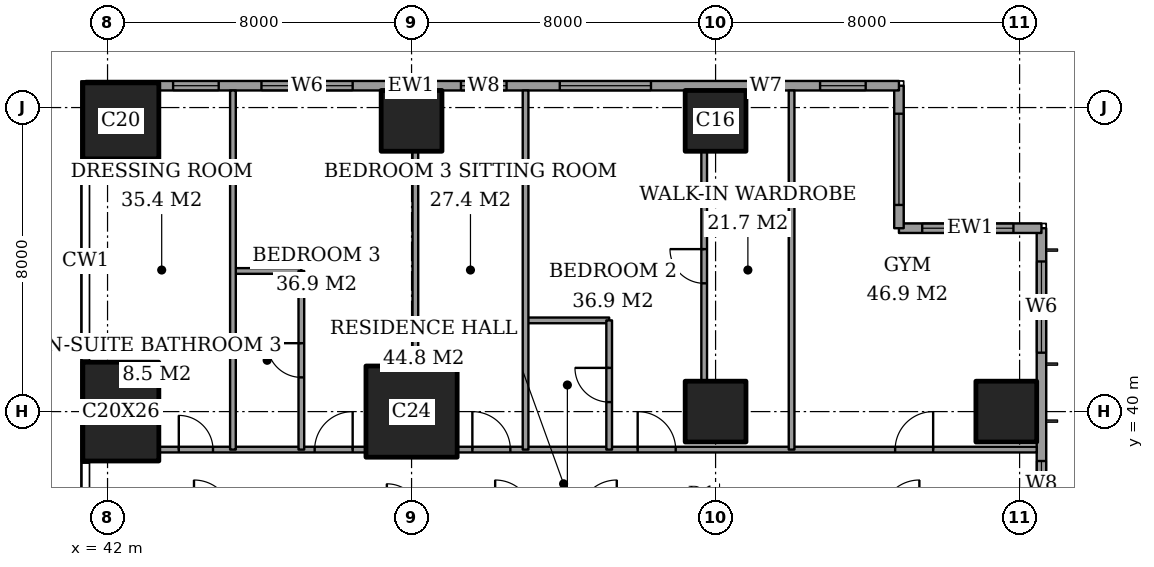
"""IFC4 building model, lengths in metres.
Left out: names, types, materials, properties, quantities, classifications, styles, units other than length and angle.
Written with IfcOpenShell. Run it as: python <this file> out.ifc"""

import sys

from ifc_helpers import new_model, si_unit, direction, frame, frame_2d, origin, origin_2d, place, context, subcontext, project, spatial, rectangle, extrude, element, fill, save


model = new_model("IFC4")
c1 = context("Model", 3, precision=1e-05, world=origin(), true_north=direction((0.0, 1.0)))
c2 = subcontext(c1, "Body", "Model", "MODEL_VIEW")
j1 = project(units=[si_unit("LENGTHUNIT", "METRE"), si_unit("PLANEANGLEUNIT", "RADIAN")], contexts=[c1])
p1 = place(None, origin())
s1 = spatial("IfcSite", under=j1, at=p1, CompositionType="ELEMENT")
p2 = place(p1, origin())
s2 = spatial("IfcBuilding", under=s1, at=p2, CompositionType="ELEMENT")
p3 = place(p2, frame((0.0, 0.0, 244.8)))
s3 = spatial("IfcBuildingStorey", under=s2, at=p3, CompositionType="ELEMENT", Elevation=244.8)
p4 = place(p3, frame((42.35, 40.0, 0.0), z_axis=(0.0, 0.0, 1.0), x_axis=(1.0, 0.0, 0.0)))
e1 = element("IfcColumn", 1, at=p4, inside=s3, PredefinedType="COLUMN", context=c2, shape_type="SweptSolid", body=[
    extrude(rectangle(XDim=2.0, YDim=2.6, at=origin_2d()), origin(), (0.0, 0.0, 1.0), 3.6),
])
p5 = place(p3, frame((42.35, 47.65, 0.0), z_axis=(0.0, 0.0, 1.0), x_axis=(1.0, 0.0, 0.0)))
e2 = element("IfcColumn", 2, at=p5, inside=s3, PredefinedType="COLUMN", context=c2, shape_type="SweptSolid", body=[
    extrude(rectangle(XDim=2.0, YDim=2.0, at=origin_2d()), origin(), (0.0, 0.0, 1.0), 3.6),
])
p6 = place(p3, frame((50.0, 40.0, 0.0), z_axis=(0.0, 0.0, 1.0), x_axis=(1.0, 0.0, 0.0)))
e3 = element("IfcColumn", 3, at=p6, inside=s3, PredefinedType="COLUMN", context=c2, shape_type="SweptSolid", body=[
    extrude(rectangle(XDim=2.4, YDim=2.4, at=origin_2d()), origin(), (0.0, 0.0, 1.0), 3.6),
])
for number, where, z_axis, x_axis in (
    (4, (50.0, 47.65, 0.0), (0.0, 0.0, 1.0), (1.0, 0.0, 0.0)),
    (5, (58.0, 40.0, 0.0), (0.0, 0.0, 1.0), (1.0, 0.0, 0.0)),
    (6, (58.0, 47.65, 0.0), (0.0, 0.0, 1.0), (1.0, 0.0, 0.0)),
    (7, (65.65, 40.0, 0.0), (0.0, 0.0, 1.0), (1.0, 0.0, 0.0)),
):
    element("IfcColumn", number, at=place(p3, frame(where, z_axis=z_axis, x_axis=x_axis)), inside=s3, PredefinedType="COLUMN", context=c2, shape_type="SweptSolid", body=[
        extrude(rectangle(XDim=1.6, YDim=1.6, at=origin_2d()), origin(), (0.0, 0.0, 1.0), 3.6),
    ])
p7 = place(p3, frame((66.575, 3.175, 0.0), z_axis=(0.0, 0.0, 1.0), x_axis=(0.0, 1.0, 0.0)))
e8 = element("IfcWall", 8, at=p7, inside=s3, PredefinedType="SOLIDWALL", context=c2, shape_type="SweptSolid", body=[
    extrude(rectangle(XDim=41.65, YDim=0.25, at=frame_2d((20.825, 0.0))), origin(), (0.0, 0.0, 1.0), 3.6),
])
p8 = place(p7, frame((0.875, 0.0, 0.6)))
e9 = element("IfcOpeningElement", 9, at=p8, cuts=e8, PredefinedType="OPENING", context=c2, shape_type="SweptSolid", body=[
    extrude(rectangle(XDim=2.4, YDim=2.0, at=frame_2d((1.2, 1.0))), frame((0.0, 0.135, 0.0), z_axis=(0.0, -1.0, 0.0), x_axis=(1.0, 0.0, 0.0)), (0.0, 0.0, 1.0), 0.27),
])
p9 = place(p7, frame((6.0, 0.0, 0.6)))
e10 = element("IfcOpeningElement", 10, at=p9, cuts=e8, PredefinedType="OPENING", context=c2, shape_type="SweptSolid", body=[
    extrude(rectangle(XDim=1.2, YDim=2.0, at=frame_2d((0.6, 1.0))), frame((0.0, 0.135, 0.0), z_axis=(0.0, -1.0, 0.0), x_axis=(1.0, 0.0, 0.0)), (0.0, 0.0, 1.0), 0.27),
])
p10 = place(p7, frame((8.525, 0.0, 0.6)))
e11 = element("IfcOpeningElement", 11, at=p10, cuts=e8, PredefinedType="OPENING", context=c2, shape_type="SweptSolid", body=[
    extrude(rectangle(XDim=2.4, YDim=2.0, at=frame_2d((1.2, 1.0))), frame((0.0, 0.135, 0.0), z_axis=(0.0, -1.0, 0.0), x_axis=(1.0, 0.0, 0.0)), (0.0, 0.0, 1.0), 0.27),
])
p11 = place(p7, frame((15.725, 0.0, 0.6)))
e12 = element("IfcOpeningElement", 12, at=p11, cuts=e8, PredefinedType="OPENING", context=c2, shape_type="SweptSolid", body=[
    extrude(rectangle(XDim=2.4, YDim=2.0, at=frame_2d((1.2, 1.0))), frame((0.0, 0.135, 0.0), z_axis=(0.0, -1.0, 0.0), x_axis=(1.0, 0.0, 0.0)), (0.0, 0.0, 1.0), 0.27),
])
p12 = place(p7, frame((23.525, 0.0, 0.6)))
e13 = element("IfcOpeningElement", 13, at=p12, cuts=e8, PredefinedType="OPENING", context=c2, shape_type="SweptSolid", body=[
    extrude(rectangle(XDim=2.4, YDim=2.0, at=frame_2d((1.2, 1.0))), frame((0.0, 0.135, 0.0), z_axis=(0.0, -1.0, 0.0), x_axis=(1.0, 0.0, 0.0)), (0.0, 0.0, 1.0), 0.27),
])
p13 = place(p7, frame((30.625, 0.0, 0.6)))
e14 = element("IfcOpeningElement", 14, at=p13, cuts=e8, PredefinedType="OPENING", context=c2, shape_type="SweptSolid", body=[
    extrude(rectangle(XDim=2.4, YDim=2.0, at=frame_2d((1.2, 1.0))), frame((0.0, 0.135, 0.0), z_axis=(0.0, -1.0, 0.0), x_axis=(1.0, 0.0, 0.0)), (0.0, 0.0, 1.0), 0.27),
])
p14 = place(p7, frame((34.325, 0.0, 0.6)))
e15 = element("IfcOpeningElement", 15, at=p14, cuts=e8, PredefinedType="OPENING", context=c2, shape_type="SweptSolid", body=[
    extrude(rectangle(XDim=1.2, YDim=2.0, at=frame_2d((0.6, 1.0))), frame((0.0, 0.135, 0.0), z_axis=(0.0, -1.0, 0.0), x_axis=(1.0, 0.0, 0.0)), (0.0, 0.0, 1.0), 0.27),
])
p15 = place(p7, frame((38.375, 0.0, 0.6)))
e16 = element("IfcOpeningElement", 16, at=p15, cuts=e8, PredefinedType="OPENING", context=c2, shape_type="SweptSolid", body=[
    extrude(rectangle(XDim=2.4, YDim=2.0, at=frame_2d((1.2, 1.0))), frame((0.0, 0.135, 0.0), z_axis=(0.0, -1.0, 0.0), x_axis=(1.0, 0.0, 0.0)), (0.0, 0.0, 1.0), 0.27),
])
p16 = place(p3, frame((66.575, 44.825, 0.0), z_axis=(0.0, 0.0, 1.0), x_axis=(-1.0, 0.0, 0.0)))
e17 = element("IfcWall", 17, at=p16, inside=s3, PredefinedType="SOLIDWALL", context=c2, shape_type="SweptSolid", body=[
    extrude(rectangle(XDim=3.75, YDim=0.25, at=frame_2d((1.875, 0.0))), origin(), (0.0, 0.0, 1.0), 3.6),
])
p17 = place(p16, frame((0.738, 0.0, 0.6)))
e18 = element("IfcOpeningElement", 18, at=p17, cuts=e17, PredefinedType="OPENING", context=c2, shape_type="SweptSolid", body=[
    extrude(rectangle(XDim=2.4, YDim=2.0, at=frame_2d((1.2, 1.0))), frame((0.0, 0.135, 0.0), z_axis=(0.0, -1.0, 0.0), x_axis=(1.0, 0.0, 0.0)), (0.0, 0.0, 1.0), 0.27),
])
p18 = place(p3, frame((62.825, 44.825, 0.0), z_axis=(0.0, 0.0, 1.0), x_axis=(0.0, 1.0, 0.0)))
e19 = element("IfcWall", 19, at=p18, inside=s3, PredefinedType="SOLIDWALL", context=c2, shape_type="SweptSolid", body=[
    extrude(rectangle(XDim=3.75, YDim=0.25, at=frame_2d((1.875, 0.0))), origin(), (0.0, 0.0, 1.0), 3.6),
])
p19 = place(p18, frame((0.613, 0.0, 0.6)))
e20 = element("IfcOpeningElement", 20, at=p19, cuts=e19, PredefinedType="OPENING", context=c2, shape_type="SweptSolid", body=[
    extrude(rectangle(XDim=2.4, YDim=2.0, at=frame_2d((1.2, 1.0))), frame((0.0, 0.135, 0.0), z_axis=(0.0, -1.0, 0.0), x_axis=(1.0, 0.0, 0.0)), (0.0, 0.0, 1.0), 0.27),
])
p20 = place(p3, frame((62.825, 48.575, 0.0), z_axis=(0.0, 0.0, 1.0), x_axis=(-1.0, 0.0, 0.0)))
e21 = element("IfcWall", 21, at=p20, inside=s3, PredefinedType="SOLIDWALL", context=c2, shape_type="SweptSolid", body=[
    extrude(rectangle(XDim=21.4, YDim=0.25, at=frame_2d((10.7, 0.0))), origin(), (0.0, 0.0, 1.0), 3.6),
])
p21 = place(p20, frame((0.875, 0.0, 0.6)))
e22 = element("IfcOpeningElement", 22, at=p21, cuts=e21, PredefinedType="OPENING", context=c2, shape_type="SweptSolid", body=[
    extrude(rectangle(XDim=1.2, YDim=2.0, at=frame_2d((0.6, 1.0))), frame((0.0, 0.135, 0.0), z_axis=(0.0, -1.0, 0.0), x_axis=(1.0, 0.0, 0.0)), (0.0, 0.0, 1.0), 0.27),
])
p22 = place(p20, frame((3.2, 0.0, 0.6)))
e23 = element("IfcOpeningElement", 23, at=p22, cuts=e21, PredefinedType="OPENING", context=c2, shape_type="SweptSolid", body=[
    extrude(rectangle(XDim=0.6, YDim=2.0, at=frame_2d((0.3, 1.0))), frame((0.0, 0.135, 0.0), z_axis=(0.0, -1.0, 0.0), x_axis=(1.0, 0.0, 0.0)), (0.0, 0.0, 1.0), 0.27),
])
p23 = place(p20, frame((6.525, 0.0, 0.6)))
e24 = element("IfcOpeningElement", 24, at=p23, cuts=e21, PredefinedType="OPENING", context=c2, shape_type="SweptSolid", body=[
    extrude(rectangle(XDim=2.4, YDim=2.0, at=frame_2d((1.2, 1.0))), frame((0.0, 0.135, 0.0), z_axis=(0.0, -1.0, 0.0), x_axis=(1.0, 0.0, 0.0)), (0.0, 0.0, 1.0), 0.27),
])
p24 = place(p20, frame((10.325, 0.0, 0.6)))
e25 = element("IfcOpeningElement", 25, at=p24, cuts=e21, PredefinedType="OPENING", context=c2, shape_type="SweptSolid", body=[
    extrude(rectangle(XDim=1.2, YDim=2.0, at=frame_2d((0.6, 1.0))), frame((0.0, 0.135, 0.0), z_axis=(0.0, -1.0, 0.0), x_axis=(1.0, 0.0, 0.0)), (0.0, 0.0, 1.0), 0.27),
])
p25 = place(p20, frame((14.375, 0.0, 0.6)))
e26 = element("IfcOpeningElement", 26, at=p25, cuts=e21, PredefinedType="OPENING", context=c2, shape_type="SweptSolid", body=[
    extrude(rectangle(XDim=2.4, YDim=2.0, at=frame_2d((1.2, 1.0))), frame((0.0, 0.135, 0.0), z_axis=(0.0, -1.0, 0.0), x_axis=(1.0, 0.0, 0.0)), (0.0, 0.0, 1.0), 0.27),
])
p26 = place(p20, frame((17.9, 0.0, 0.6)))
e27 = element("IfcOpeningElement", 27, at=p26, cuts=e21, PredefinedType="OPENING", context=c2, shape_type="SweptSolid", body=[
    extrude(rectangle(XDim=1.2, YDim=2.0, at=frame_2d((0.6, 1.0))), frame((0.0, 0.135, 0.0), z_axis=(0.0, -1.0, 0.0), x_axis=(1.0, 0.0, 0.0)), (0.0, 0.0, 1.0), 0.27),
])
p27 = place(p3, frame((43.35, 39.0, 0.0), z_axis=(0.0, 0.0, 1.0), x_axis=(1.0, 0.0, 0.0)))
e28 = element("IfcWall", 28, at=p27, inside=s3, PredefinedType="PARTITIONING", context=c2, shape_type="SweptSolid", body=[
    extrude(rectangle(XDim=5.45, YDim=0.15, at=frame_2d((2.725, 0.0))), origin(), (0.0, 0.0, 1.0), 3.35),
])
p28 = place(p27, frame((4.1, 0.0, 0.0)))
e29 = element("IfcOpeningElement", 29, at=p28, cuts=e28, PredefinedType="OPENING", context=c2, shape_type="SweptSolid", body=[
    extrude(rectangle(XDim=1.0, YDim=2.1, at=frame_2d((0.5, 1.05))), frame((0.0, 0.085, 0.0), z_axis=(0.0, -1.0, 0.0), x_axis=(1.0, 0.0, 0.0)), (0.0, 0.0, 1.0), 0.17),
])
p29 = place(p27, frame((0.525, 0.0, 0.0)))
e30 = element("IfcOpeningElement", 30, at=p29, cuts=e28, PredefinedType="OPENING", context=c2, shape_type="SweptSolid", body=[
    extrude(rectangle(XDim=0.9, YDim=2.1, at=frame_2d((0.45, 1.05))), frame((0.0, 0.085, 0.0), z_axis=(0.0, -1.0, 0.0), x_axis=(1.0, 0.0, 0.0)), (0.0, 0.0, 1.0), 0.17),
])
p30 = place(p3, frame((51.2, 39.0, 0.0), z_axis=(0.0, 0.0, 1.0), x_axis=(1.0, 0.0, 0.0)))
e31 = element("IfcWall", 31, at=p30, inside=s3, PredefinedType="PARTITIONING", context=c2, shape_type="SweptSolid", body=[
    extrude(rectangle(XDim=15.25, YDim=0.15, at=frame_2d((7.625, 0.0))), origin(), (0.0, 0.0, 1.0), 3.35),
])
p31 = place(p30, frame((11.525, 0.0, 0.0)))
e32 = element("IfcOpeningElement", 32, at=p31, cuts=e31, PredefinedType="OPENING", context=c2, shape_type="SweptSolid", body=[
    extrude(rectangle(XDim=1.0, YDim=2.1, at=frame_2d((0.5, 1.05))), frame((0.0, 0.085, 0.0), z_axis=(0.0, -1.0, 0.0), x_axis=(1.0, 0.0, 0.0)), (0.0, 0.0, 1.0), 0.17),
])
p32 = place(p30, frame((4.75, 0.0, 0.0)))
e33 = element("IfcOpeningElement", 33, at=p32, cuts=e31, PredefinedType="OPENING", context=c2, shape_type="SweptSolid", body=[
    extrude(rectangle(XDim=1.0, YDim=2.1, at=frame_2d((0.5, 1.05))), frame((0.0, 0.085, 0.0), z_axis=(0.0, -1.0, 0.0), x_axis=(1.0, 0.0, 0.0)), (0.0, 0.0, 1.0), 0.17),
])
p33 = place(p30, frame((0.4, 0.0, 0.0)))
e34 = element("IfcOpeningElement", 34, at=p33, cuts=e31, PredefinedType="OPENING", context=c2, shape_type="SweptSolid", body=[
    extrude(rectangle(XDim=1.0, YDim=2.1, at=frame_2d((0.5, 1.05))), frame((0.0, 0.085, 0.0), z_axis=(0.0, -1.0, 0.0), x_axis=(1.0, 0.0, 0.0)), (0.0, 0.0, 1.0), 0.17),
])
p34 = place(p3, frame((53.0, 42.4, 0.0), z_axis=(0.0, 0.0, 1.0), x_axis=(1.0, 0.0, 0.0)))
e35 = element("IfcWall", 35, at=p34, inside=s3, PredefinedType="PARTITIONING", context=c2, shape_type="SweptSolid", body=[
    extrude(rectangle(XDim=2.2, YDim=0.15, at=frame_2d((1.1, 0.0))), origin(), (0.0, 0.0, 1.0), 3.35),
])
p35 = place(p3, frame((45.3, 43.7, 0.0), z_axis=(0.0, 0.0, 1.0), x_axis=(1.0, 0.0, 0.0)))
e36 = element("IfcWall", 36, at=p35, inside=s3, PredefinedType="PARTITIONING", context=c2, shape_type="SweptSolid", body=[
    extrude(rectangle(XDim=1.8, YDim=0.15, at=frame_2d((0.9, 0.0))), origin(), (0.0, 0.0, 1.0), 3.35),
])
p36 = place(p3, frame((45.3, 39.0, 0.0), z_axis=(0.0, 0.0, 1.0), x_axis=(0.0, 1.0, 0.0)))
e37 = element("IfcWall", 37, at=p36, inside=s3, PredefinedType="PARTITIONING", context=c2, shape_type="SweptSolid", body=[
    extrude(rectangle(XDim=9.45, YDim=0.15, at=frame_2d((4.725, 0.0))), origin(), (0.0, 0.0, 1.0), 3.35),
])
p37 = place(p3, frame((47.1, 39.0, 0.0), z_axis=(0.0, 0.0, 1.0), x_axis=(0.0, 1.0, 0.0)))
e38 = element("IfcWall", 38, at=p37, inside=s3, PredefinedType="PARTITIONING", context=c2, shape_type="SweptSolid", body=[
    extrude(rectangle(XDim=4.7, YDim=0.15, at=frame_2d((2.35, 0.0))), origin(), (0.0, 0.0, 1.0), 3.35),
])
p38 = place(p37, frame((1.9, 0.0, 0.0)))
e39 = element("IfcOpeningElement", 39, at=p38, cuts=e38, PredefinedType="OPENING", context=c2, shape_type="SweptSolid", body=[
    extrude(rectangle(XDim=0.9, YDim=2.1, at=frame_2d((0.45, 1.05))), frame((0.0, 0.085, 0.0), z_axis=(0.0, -1.0, 0.0), x_axis=(1.0, 0.0, 0.0)), (0.0, 0.0, 1.0), 0.17),
])
p39 = place(p3, frame((50.1, 41.2, 0.0), z_axis=(0.0, 0.0, 1.0), x_axis=(0.0, 1.0, 0.0)))
e40 = element("IfcWall", 40, at=p39, inside=s3, PredefinedType="PARTITIONING", context=c2, shape_type="SweptSolid", body=[
    extrude(rectangle(XDim=5.65, YDim=0.15, at=frame_2d((2.825, 0.0))), origin(), (0.0, 0.0, 1.0), 3.35),
])
p40 = place(p3, frame((53.0, 39.0, 0.0), z_axis=(0.0, 0.0, 1.0), x_axis=(0.0, 1.0, 0.0)))
e41 = element("IfcWall", 41, at=p40, inside=s3, PredefinedType="PARTITIONING", context=c2, shape_type="SweptSolid", body=[
    extrude(rectangle(XDim=9.45, YDim=0.15, at=frame_2d((4.725, 0.0))), origin(), (0.0, 0.0, 1.0), 3.35),
])
p41 = place(p3, frame((55.2, 39.0, 0.0), z_axis=(0.0, 0.0, 1.0), x_axis=(0.0, 1.0, 0.0)))
e42 = element("IfcWall", 42, at=p41, inside=s3, PredefinedType="PARTITIONING", context=c2, shape_type="SweptSolid", body=[
    extrude(rectangle(XDim=3.4, YDim=0.15, at=frame_2d((1.7, 0.0))), origin(), (0.0, 0.0, 1.0), 3.35),
])
p42 = place(p41, frame((1.25, 0.0, 0.0)))
e43 = element("IfcOpeningElement", 43, at=p42, cuts=e42, PredefinedType="OPENING", context=c2, shape_type="SweptSolid", body=[
    extrude(rectangle(XDim=0.9, YDim=2.1, at=frame_2d((0.45, 1.05))), frame((0.0, 0.085, 0.0), z_axis=(0.0, -1.0, 0.0), x_axis=(1.0, 0.0, 0.0)), (0.0, 0.0, 1.0), 0.17),
])
p43 = place(p3, frame((57.7, 40.8, 0.0), z_axis=(0.0, 0.0, 1.0), x_axis=(0.0, 1.0, 0.0)))
e44 = element("IfcWall", 44, at=p43, inside=s3, PredefinedType="PARTITIONING", context=c2, shape_type="SweptSolid", body=[
    extrude(rectangle(XDim=6.05, YDim=0.15, at=frame_2d((3.025, 0.0))), origin(), (0.0, 0.0, 1.0), 3.35),
])
p44 = place(p43, frame((2.575, 0.0, 0.0)))
e45 = element("IfcOpeningElement", 45, at=p44, cuts=e44, PredefinedType="OPENING", context=c2, shape_type="SweptSolid", body=[
    extrude(rectangle(XDim=0.9, YDim=2.1, at=frame_2d((0.45, 1.05))), frame((0.0, 0.085, 0.0), z_axis=(0.0, -1.0, 0.0), x_axis=(1.0, 0.0, 0.0)), (0.0, 0.0, 1.0), 0.17),
])
p45 = place(p3, frame((60.0, 39.0, 0.0), z_axis=(0.0, 0.0, 1.0), x_axis=(0.0, 1.0, 0.0)))
e46 = element("IfcWall", 46, at=p45, inside=s3, PredefinedType="PARTITIONING", context=c2, shape_type="SweptSolid", body=[
    extrude(rectangle(XDim=9.45, YDim=0.15, at=frame_2d((4.725, 0.0))), origin(), (0.0, 0.0, 1.0), 3.35),
])
p46 = place(p14, origin())
e47 = element("IfcWindow", 47, at=p46, inside=s3, PartitioningType="SINGLE_PANEL", PredefinedType="WINDOW", context=c2, shape_type="SweptSolid", body=[
    extrude(rectangle(XDim=1.2, YDim=2.0, at=frame_2d((0.6, 1.0))), frame((0.0, 0.03, 0.0), z_axis=(0.0, -1.0, 0.0), x_axis=(1.0, 0.0, 0.0)), (0.0, 0.0, 1.0), 0.06),
])
fill(e15, e47)
p47 = place(p15, origin())
e48 = element("IfcWindow", 48, at=p47, inside=s3, PartitioningType="SINGLE_PANEL", PredefinedType="WINDOW", context=c2, shape_type="SweptSolid", body=[
    extrude(rectangle(XDim=2.4, YDim=2.0, at=frame_2d((1.2, 1.0))), frame((0.0, 0.03, 0.0), z_axis=(0.0, -1.0, 0.0), x_axis=(1.0, 0.0, 0.0)), (0.0, 0.0, 1.0), 0.06),
])
fill(e16, e48)
p48 = place(p17, origin())
e49 = element("IfcWindow", 49, at=p48, inside=s3, PartitioningType="SINGLE_PANEL", PredefinedType="WINDOW", context=c2, shape_type="SweptSolid", body=[
    extrude(rectangle(XDim=2.4, YDim=2.0, at=frame_2d((1.2, 1.0))), frame((0.0, 0.03, 0.0), z_axis=(0.0, -1.0, 0.0), x_axis=(1.0, 0.0, 0.0)), (0.0, 0.0, 1.0), 0.06),
])
fill(e18, e49)
p49 = place(p19, origin())
e50 = element("IfcWindow", 50, at=p49, inside=s3, PartitioningType="SINGLE_PANEL", PredefinedType="WINDOW", context=c2, shape_type="SweptSolid", body=[
    extrude(rectangle(XDim=2.4, YDim=2.0, at=frame_2d((1.2, 1.0))), frame((0.0, 0.03, 0.0), z_axis=(0.0, -1.0, 0.0), x_axis=(1.0, 0.0, 0.0)), (0.0, 0.0, 1.0), 0.06),
])
fill(e20, e50)
p50 = place(p21, origin())
e51 = element("IfcWindow", 51, at=p50, inside=s3, PartitioningType="SINGLE_PANEL", PredefinedType="WINDOW", context=c2, shape_type="SweptSolid", body=[
    extrude(rectangle(XDim=1.2, YDim=2.0, at=frame_2d((0.6, 1.0))), frame((0.0, 0.03, 0.0), z_axis=(0.0, -1.0, 0.0), x_axis=(1.0, 0.0, 0.0)), (0.0, 0.0, 1.0), 0.06),
])
fill(e22, e51)
p51 = place(p22, origin())
e52 = element("IfcWindow", 52, at=p51, inside=s3, PartitioningType="SINGLE_PANEL", PredefinedType="WINDOW", context=c2, shape_type="SweptSolid", body=[
    extrude(rectangle(XDim=0.6, YDim=2.0, at=frame_2d((0.3, 1.0))), frame((0.0, 0.03, 0.0), z_axis=(0.0, -1.0, 0.0), x_axis=(1.0, 0.0, 0.0)), (0.0, 0.0, 1.0), 0.06),
])
fill(e23, e52)
p52 = place(p23, origin())
e53 = element("IfcWindow", 53, at=p52, inside=s3, PartitioningType="SINGLE_PANEL", PredefinedType="WINDOW", context=c2, shape_type="SweptSolid", body=[
    extrude(rectangle(XDim=2.4, YDim=2.0, at=frame_2d((1.2, 1.0))), frame((0.0, 0.03, 0.0), z_axis=(0.0, -1.0, 0.0), x_axis=(1.0, 0.0, 0.0)), (0.0, 0.0, 1.0), 0.06),
])
fill(e24, e53)
p53 = place(p24, origin())
e54 = element("IfcWindow", 54, at=p53, inside=s3, PartitioningType="SINGLE_PANEL", PredefinedType="WINDOW", context=c2, shape_type="SweptSolid", body=[
    extrude(rectangle(XDim=1.2, YDim=2.0, at=frame_2d((0.6, 1.0))), frame((0.0, 0.03, 0.0), z_axis=(0.0, -1.0, 0.0), x_axis=(1.0, 0.0, 0.0)), (0.0, 0.0, 1.0), 0.06),
])
fill(e25, e54)
p54 = place(p25, origin())
e55 = element("IfcWindow", 55, at=p54, inside=s3, PartitioningType="SINGLE_PANEL", PredefinedType="WINDOW", context=c2, shape_type="SweptSolid", body=[
    extrude(rectangle(XDim=2.4, YDim=2.0, at=frame_2d((1.2, 1.0))), frame((0.0, 0.03, 0.0), z_axis=(0.0, -1.0, 0.0), x_axis=(1.0, 0.0, 0.0)), (0.0, 0.0, 1.0), 0.06),
])
fill(e26, e55)
p55 = place(p26, origin())
e56 = element("IfcWindow", 56, at=p55, inside=s3, PartitioningType="SINGLE_PANEL", PredefinedType="WINDOW", context=c2, shape_type="SweptSolid", body=[
    extrude(rectangle(XDim=1.2, YDim=2.0, at=frame_2d((0.6, 1.0))), frame((0.0, 0.03, 0.0), z_axis=(0.0, -1.0, 0.0), x_axis=(1.0, 0.0, 0.0)), (0.0, 0.0, 1.0), 0.06),
])
fill(e27, e56)
p56 = place(p31, origin())
e57 = element("IfcDoor", 57, at=p56, inside=s3, OperationType="SINGLE_SWING_LEFT", PredefinedType="DOOR", context=c2, shape_type="SweptSolid", body=[
    extrude(rectangle(XDim=1.0, YDim=2.1, at=frame_2d((0.5, 1.05))), frame((0.0, 0.025, 0.0), z_axis=(0.0, -1.0, 0.0), x_axis=(1.0, 0.0, 0.0)), (0.0, 0.0, 1.0), 0.05),
])
fill(e32, e57)
p57 = place(p44, origin())
e58 = element("IfcDoor", 58, at=p57, inside=s3, OperationType="SINGLE_SWING_LEFT", PredefinedType="DOOR", context=c2, shape_type="SweptSolid", body=[
    extrude(rectangle(XDim=0.9, YDim=2.1, at=frame_2d((0.45, 1.05))), frame((0.0, 0.025, 0.0), z_axis=(0.0, -1.0, 0.0), x_axis=(1.0, 0.0, 0.0)), (0.0, 0.0, 1.0), 0.05),
])
fill(e45, e58)
p58 = place(p42, origin())
e59 = element("IfcDoor", 59, at=p58, inside=s3, OperationType="SINGLE_SWING_LEFT", PredefinedType="DOOR", context=c2, shape_type="SweptSolid", body=[
    extrude(rectangle(XDim=0.9, YDim=2.1, at=frame_2d((0.45, 1.05))), frame((0.0, 0.025, 0.0), z_axis=(0.0, -1.0, 0.0), x_axis=(1.0, 0.0, 0.0)), (0.0, 0.0, 1.0), 0.05),
])
fill(e43, e59)
p59 = place(p32, origin())
e60 = element("IfcDoor", 60, at=p59, inside=s3, OperationType="SINGLE_SWING_RIGHT", PredefinedType="DOOR", context=c2, shape_type="SweptSolid", body=[
    extrude(rectangle(XDim=1.0, YDim=2.1, at=frame_2d((0.5, 1.05))), frame((0.0, 0.025, 0.0), z_axis=(0.0, -1.0, 0.0), x_axis=(1.0, 0.0, 0.0)), (0.0, 0.0, 1.0), 0.05),
])
fill(e33, e60)
p60 = place(p33, origin())
e61 = element("IfcDoor", 61, at=p60, inside=s3, OperationType="SINGLE_SWING_RIGHT", PredefinedType="DOOR", context=c2, shape_type="SweptSolid", body=[
    extrude(rectangle(XDim=1.0, YDim=2.1, at=frame_2d((0.5, 1.05))), frame((0.0, 0.025, 0.0), z_axis=(0.0, -1.0, 0.0), x_axis=(1.0, 0.0, 0.0)), (0.0, 0.0, 1.0), 0.05),
])
fill(e34, e61)
p61 = place(p38, origin())
e62 = element("IfcDoor", 62, at=p61, inside=s3, OperationType="SINGLE_SWING_LEFT", PredefinedType="DOOR", context=c2, shape_type="SweptSolid", body=[
    extrude(rectangle(XDim=0.9, YDim=2.1, at=frame_2d((0.45, 1.05))), frame((0.0, 0.025, 0.0), z_axis=(0.0, -1.0, 0.0), x_axis=(1.0, 0.0, 0.0)), (0.0, 0.0, 1.0), 0.05),
])
fill(e39, e62)
p62 = place(p28, origin())
e63 = element("IfcDoor", 63, at=p62, inside=s3, OperationType="SINGLE_SWING_LEFT", PredefinedType="DOOR", context=c2, shape_type="SweptSolid", body=[
    extrude(rectangle(XDim=1.0, YDim=2.1, at=frame_2d((0.5, 1.05))), frame((0.0, 0.025, 0.0), z_axis=(0.0, -1.0, 0.0), x_axis=(1.0, 0.0, 0.0)), (0.0, 0.0, 1.0), 0.05),
])
fill(e29, e63)
p63 = place(p29, origin())
e64 = element("IfcDoor", 64, at=p63, inside=s3, OperationType="SINGLE_SWING_RIGHT", PredefinedType="DOOR", context=c2, shape_type="SweptSolid", body=[
    extrude(rectangle(XDim=0.9, YDim=2.1, at=frame_2d((0.45, 1.05))), frame((0.0, 0.025, 0.0), z_axis=(0.0, -1.0, 0.0), x_axis=(1.0, 0.0, 0.0)), (0.0, 0.0, 1.0), 0.05),
])
fill(e30, e64)
save(model, sys.argv[1])
